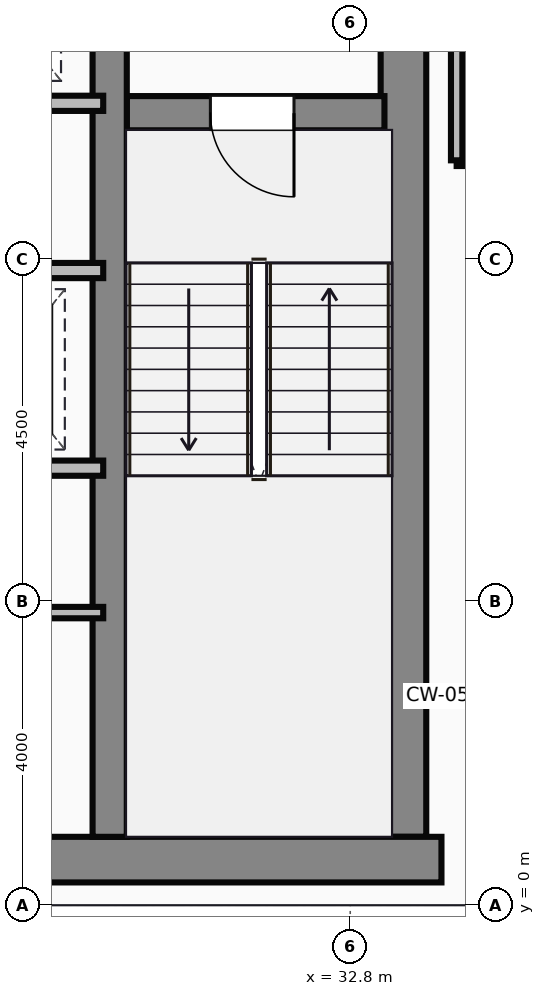
"""IFC4 building model, lengths in metres.
Left out: names, types, materials, properties, quantities, classifications, styles, units other than length and angle.
Written with IfcOpenShell. Run it as: python <this file> out.ifc"""

import sys

from ifc_helpers import new_model, si_unit, direction, frame, frame_2d, origin, place, context, subcontext, project, spatial, rectangle, extrude, source, transform, mapped, element, fill, save


model = new_model("IFC4")
c1 = context("Model", 3, precision=1e-05, world=origin(), true_north=direction((0.0, 1.0)))
c2 = subcontext(c1, "Body", "Model", "MODEL_VIEW")
j1 = project(units=[si_unit("LENGTHUNIT", "METRE"), si_unit("PLANEANGLEUNIT", "RADIAN")], contexts=[c1])
p1 = place(None, origin())
s1 = spatial("IfcSite", under=j1, at=p1, CompositionType="ELEMENT")
p2 = place(p1, origin())
s2 = spatial("IfcBuilding", under=s1, at=p2, CompositionType="ELEMENT")
p3 = place(p2, frame((0.0, 0.0, 203.2)))
s3 = spatial("IfcBuildingStorey", under=s2, at=p3, CompositionType="ELEMENT", Elevation=203.2)
m1 = source(origin(), c2, "Body", "SweptSolid", [
    extrude(rectangle(XDim=29.5, YDim=0.6, at=frame_2d((14.75, 0.0))), origin(), (0.0, 0.0, 1.0), 3.65),
])
p4 = place(p3, frame((4.5, 0.6, 0.0), z_axis=(0.0, 0.0, 1.0), x_axis=(1.0, 0.0, 0.0)))
e1 = element("IfcWall", 1, at=p4, inside=s3, PredefinedType="SHEAR", context=c2, shape_type="MappedRepresentation", body=[
    mapped(m1, transform((0.0, 0.0, 0.0))),
])
m2 = source(origin(), c2, "Body", "SweptSolid", [
    extrude(rectangle(XDim=13.1, YDim=0.6, at=frame_2d((6.55, 0.0))), origin(), (0.0, 0.0, 1.0), 3.65),
])
p5 = place(p3, frame((33.5, 0.9, 0.0), z_axis=(0.0, 0.0, 1.0), x_axis=(0.0, 1.0, 0.0)))
e2 = element("IfcWall", 2, at=p5, inside=s3, PredefinedType="SHEAR", context=c2, shape_type="MappedRepresentation", body=[
    mapped(m2, transform((0.0, 0.0, 0.0))),
])
m3 = source(origin(), c2, "Body", "SweptSolid", [
    extrude(rectangle(XDim=12.5, YDim=0.45, at=frame_2d((6.25, 0.0))), origin(), (0.0, 0.0, 1.0), 3.65),
])
p6 = place(p3, frame((29.635, 0.9, 0.0), z_axis=(0.0, 0.0, 1.0), x_axis=(0.0, 1.0, 0.0)))
e3 = element("IfcWall", 3, at=p6, inside=s3, PredefinedType="SHEAR", context=c2, shape_type="MappedRepresentation", body=[
    mapped(m3, transform((0.0, 0.0, 0.0))),
])
m4 = source(origin(), c2, "Body", "SweptSolid", [
    extrude(rectangle(XDim=3.39, YDim=0.45, at=frame_2d((1.695, 0.0))), origin(), (0.0, 0.0, 1.0), 3.65),
])
p7 = place(p3, frame((29.86, 10.42, 0.0), z_axis=(0.0, 0.0, 1.0), x_axis=(1.0, 0.0, 0.0)))
e4 = element("IfcWall", 4, at=p7, inside=s3, PredefinedType="SHEAR", context=c2, shape_type="MappedRepresentation", body=[
    mapped(m4, transform((0.0, 0.0, 0.0))),
])
p8 = place(p7, frame((1.1, 0.0, 0.0)))
e5 = element("IfcOpeningElement", 5, at=p8, cuts=e4, PredefinedType="OPENING", context=c2, shape_type="SweptSolid", body=[
    extrude(rectangle(XDim=1.1, YDim=2.15, at=frame_2d((0.55, 1.075))), frame((0.0, 0.235, 0.0), z_axis=(0.0, -1.0, 0.0), x_axis=(1.0, 0.0, 0.0)), (0.0, 0.0, 1.0), 0.47),
])
m5 = source(origin(), c2, "Body", "SweptSolid", [
    extrude(rectangle(XDim=8.8, YDim=0.2, at=frame_2d((4.4, 0.0))), origin(), (0.0, 0.0, 1.0), 3.4),
])
p9 = place(p3, frame((20.75, 10.55, 0.0), z_axis=(0.0, 0.0, 1.0), x_axis=(1.0, 0.0, 0.0)))
e6 = element("IfcWall", 6, at=p9, inside=s3, PredefinedType="PARTITIONING", context=c2, shape_type="MappedRepresentation", body=[
    mapped(m5, transform((0.0, 0.0, 0.0))),
])
p10 = place(p9, frame((0.5, 0.0, 0.0)))
e7 = element("IfcOpeningElement", 7, at=p10, cuts=e6, PredefinedType="OPENING", context=c2, shape_type="SweptSolid", body=[
    extrude(rectangle(XDim=1.05, YDim=2.15, at=frame_2d((0.525, 1.075))), frame((0.0, 0.11, 0.0), z_axis=(0.0, -1.0, 0.0), x_axis=(1.0, 0.0, 0.0)), (0.0, 0.0, 1.0), 0.22),
])
p11 = place(p9, frame((2.6, 0.0, 0.0)))
e8 = element("IfcOpeningElement", 8, at=p11, cuts=e6, PredefinedType="OPENING", context=c2, shape_type="SweptSolid", body=[
    extrude(rectangle(XDim=1.05, YDim=2.15, at=frame_2d((0.525, 1.075))), frame((0.0, 0.11, 0.0), z_axis=(0.0, -1.0, 0.0), x_axis=(1.0, 0.0, 0.0)), (0.0, 0.0, 1.0), 0.22),
])
p12 = place(p9, frame((4.7, 0.0, 0.0)))
e9 = element("IfcOpeningElement", 9, at=p12, cuts=e6, PredefinedType="OPENING", context=c2, shape_type="SweptSolid", body=[
    extrude(rectangle(XDim=1.05, YDim=2.15, at=frame_2d((0.525, 1.075))), frame((0.0, 0.11, 0.0), z_axis=(0.0, -1.0, 0.0), x_axis=(1.0, 0.0, 0.0)), (0.0, 0.0, 1.0), 0.22),
])
p13 = place(p9, frame((6.8, 0.0, 0.0)))
e10 = element("IfcOpeningElement", 10, at=p13, cuts=e6, PredefinedType="OPENING", context=c2, shape_type="SweptSolid", body=[
    extrude(rectangle(XDim=1.05, YDim=2.15, at=frame_2d((0.525, 1.075))), frame((0.0, 0.11, 0.0), z_axis=(0.0, -1.0, 0.0), x_axis=(1.0, 0.0, 0.0)), (0.0, 0.0, 1.0), 0.22),
])
m6 = source(origin(), c2, "Body", "SweptSolid", [
    extrude(rectangle(XDim=4.55, YDim=0.2, at=frame_2d((2.275, 0.0))), origin(), (0.0, 0.0, 1.0), 3.4),
])
p14 = place(p3, frame((25.0, 8.35, 0.0), z_axis=(0.0, 0.0, 1.0), x_axis=(1.0, 0.0, 0.0)))
e11 = element("IfcWall", 11, at=p14, inside=s3, PredefinedType="PARTITIONING", context=c2, shape_type="MappedRepresentation", body=[
    mapped(m6, transform((0.0, 0.0, 0.0))),
])
p15 = place(p14, frame((0.5, 0.0, 0.0)))
e12 = element("IfcOpeningElement", 12, at=p15, cuts=e11, PredefinedType="OPENING", context=c2, shape_type="SweptSolid", body=[
    extrude(rectangle(XDim=1.05, YDim=2.15, at=frame_2d((0.525, 1.075))), frame((0.0, 0.11, 0.0), z_axis=(0.0, -1.0, 0.0), x_axis=(1.0, 0.0, 0.0)), (0.0, 0.0, 1.0), 0.22),
])
p16 = place(p14, frame((2.6, 0.0, 0.0)))
e13 = element("IfcOpeningElement", 13, at=p16, cuts=e11, PredefinedType="OPENING", context=c2, shape_type="SweptSolid", body=[
    extrude(rectangle(XDim=1.05, YDim=2.15, at=frame_2d((0.525, 1.075))), frame((0.0, 0.11, 0.0), z_axis=(0.0, -1.0, 0.0), x_axis=(1.0, 0.0, 0.0)), (0.0, 0.0, 1.0), 0.22),
])
p17 = place(p3, frame((25.0, 5.75, 0.0), z_axis=(0.0, 0.0, 1.0), x_axis=(1.0, 0.0, 0.0)))
e14 = element("IfcWall", 14, at=p17, inside=s3, PredefinedType="PARTITIONING", context=c2, shape_type="MappedRepresentation", body=[
    mapped(m6, transform((0.0, 0.0, 0.0))),
])
m7 = source(origin(), c2, "Body", "SweptSolid", [
    extrude(rectangle(XDim=4.55, YDim=0.15, at=frame_2d((2.275, 0.0))), origin(), (0.0, 0.0, 1.0), 3.4),
])
p18 = place(p3, frame((25.0, 3.85, 0.0), z_axis=(0.0, 0.0, 1.0), x_axis=(1.0, 0.0, 0.0)))
e15 = element("IfcWall", 15, at=p18, inside=s3, PredefinedType="PARTITIONING", context=c2, shape_type="MappedRepresentation", body=[
    mapped(m7, transform((0.0, 0.0, 0.0))),
])
m8 = source(origin(), c2, "Body", "SweptSolid", [
    extrude(rectangle(XDim=4.8, YDim=0.15, at=frame_2d((2.4, 0.0))), origin(), (0.0, 0.0, 1.0), 3.4),
])
p19 = place(p3, frame((34.2, 9.8, 0.0), z_axis=(0.0, 0.0, 1.0), x_axis=(1.0, 0.0, 0.0)))
e16 = element("IfcWall", 16, at=p19, inside=s3, PredefinedType="PARTITIONING", context=c2, shape_type="MappedRepresentation", body=[
    mapped(m8, transform((0.0, 0.0, 0.0))),
])
m9 = source(origin(), c2, "Body", "SweptSolid", [
    extrude(rectangle(XDim=4.18, YDim=0.15, at=frame_2d((2.09, 0.0))), origin(), (0.0, 0.0, 1.0), 3.4),
])
p20 = place(p3, frame((34.2, 9.8, 0.0), z_axis=(0.0, 0.0, 1.0), x_axis=(0.0, 1.0, 0.0)))
e17 = element("IfcWall", 17, at=p20, inside=s3, PredefinedType="PARTITIONING", context=c2, shape_type="MappedRepresentation", body=[
    mapped(m9, transform((0.0, 0.0, 0.0))),
])
m10 = source(origin(), c2, "Body", "SweptSolid", [
    extrude(rectangle(XDim=1.1, YDim=2.15, at=frame_2d((0.55, 1.075))), frame((0.0, 0.025, 0.0), z_axis=(0.0, -1.0, 0.0), x_axis=(1.0, 0.0, 0.0)), (0.0, 0.0, 1.0), 0.05),
])
p21 = place(p8, frame((1.1, 0.0, 0.0), z_axis=(0.0, 0.0, 1.0), x_axis=(-1.0, 0.0, 0.0)))
e18 = element("IfcDoor", 18, at=p21, inside=s3, OperationType="SINGLE_SWING_RIGHT", PredefinedType="DOOR", context=c2, shape_type="MappedRepresentation", body=[
    mapped(m10, transform((0.0, 0.0, 0.0))),
])
fill(e5, e18)
save(model, sys.argv[1])
